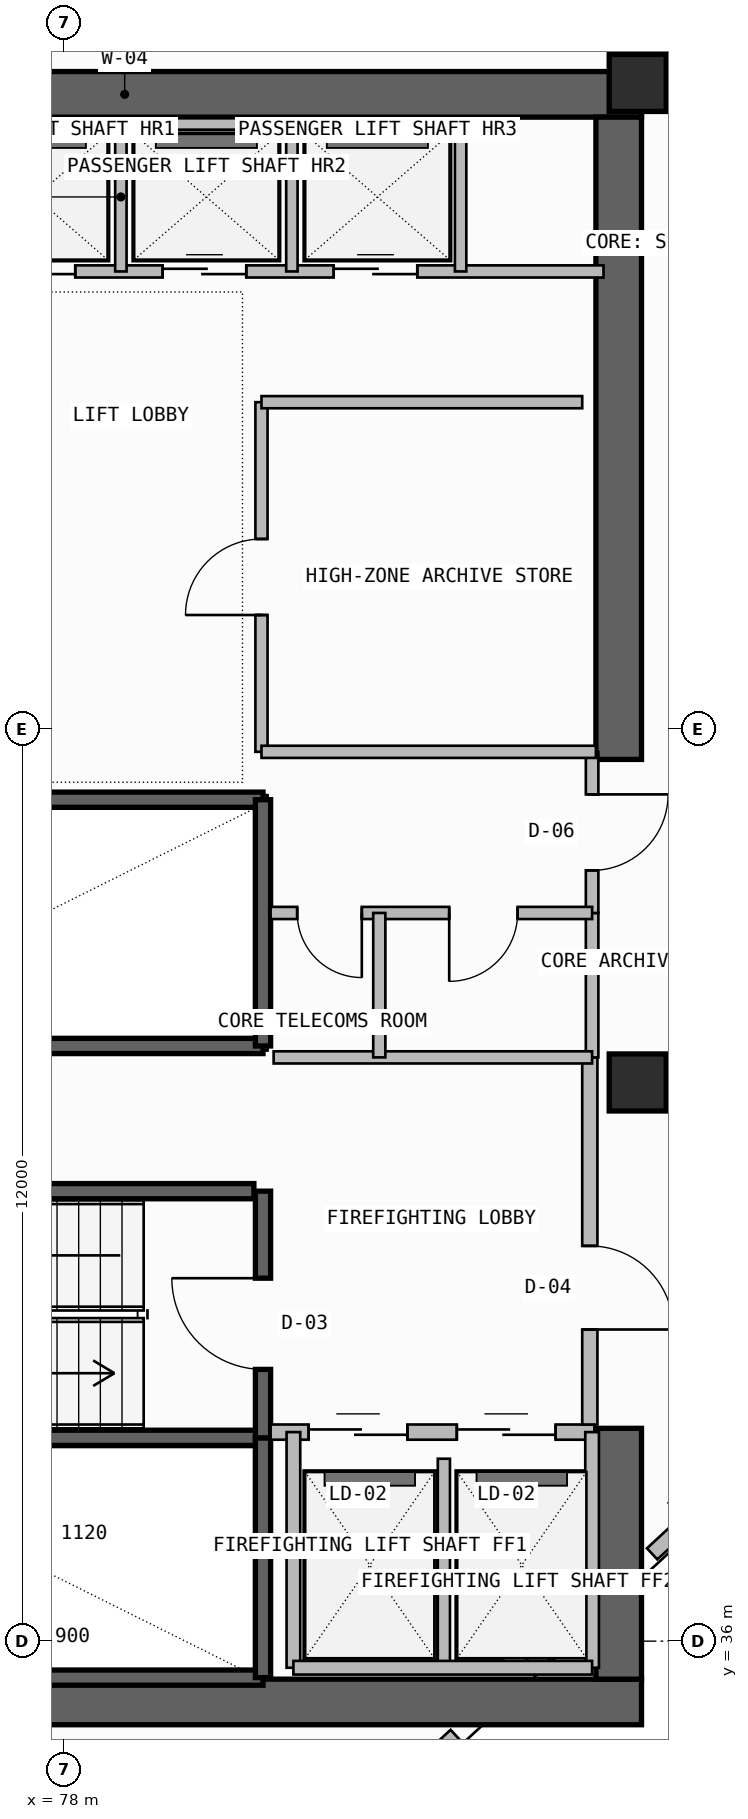
"""IFC4 building model, lengths in metres.
Left out: names, types, materials, properties, quantities, classifications, styles, units other than length and angle.
Written with IfcOpenShell. Run it as: python <this file> out.ifc"""

import sys

from ifc_helpers import new_model, si_unit, direction, frame, frame_2d, origin, origin_2d, place, context, subcontext, project, spatial, rectangle, extrude, element, fill, save


model = new_model("IFC4")
c1 = context("Model", 3, precision=1e-05, world=origin(), true_north=direction((0.0, 1.0)))
c2 = subcontext(c1, "Body", "Model", "MODEL_VIEW")
j1 = project(units=[si_unit("LENGTHUNIT", "METRE"), si_unit("PLANEANGLEUNIT", "RADIAN")], contexts=[c1])
p1 = place(None, origin())
s1 = spatial("IfcSite", under=j1, at=p1, CompositionType="ELEMENT")
p2 = place(p1, origin())
s2 = spatial("IfcBuilding", under=s1, at=p2, CompositionType="ELEMENT")
p3 = place(p2, frame((0.0, 0.0, 267.78)))
s3 = spatial("IfcBuildingStorey", under=s2, at=p3, CompositionType="ELEMENT", Elevation=267.78)
p4 = place(p3, frame((72.3, 35.2, -0.26), z_axis=(0.0, 0.0, 1.0), x_axis=(1.0, 0.0, 0.0)))
e1 = element("IfcWall", 1, at=p4, inside=s3, PredefinedType="SHEAR", context=c2, shape_type="SweptSolid", body=[
    extrude(rectangle(XDim=13.3, YDim=0.6, at=frame_2d((6.65, 0.0))), origin(), (0.0, 0.0, 1.0), 3.52),
])
p5 = place(p3, frame((85.3, 35.5, -0.26), z_axis=(0.0, 0.0, 1.0), x_axis=(0.0, 1.0, 0.0)))
e2 = element("IfcWall", 2, at=p5, inside=s3, PredefinedType="SHEAR", context=c2, shape_type="SweptSolid", body=[
    extrude(rectangle(XDim=3.3, YDim=0.6, at=frame_2d((1.65, 0.0))), origin(), (0.0, 0.0, 1.0), 3.52),
])
p6 = place(p3, frame((72.0, 56.35, -0.26), z_axis=(0.0, 0.0, 1.0), x_axis=(1.0, 0.0, 0.0)))
e3 = element("IfcWall", 3, at=p6, inside=s3, PredefinedType="SHEAR", context=c2, shape_type="SweptSolid", body=[
    extrude(rectangle(XDim=13.6, YDim=0.6, at=frame_2d((6.8, 0.0))), origin(), (0.0, 0.0, 1.0), 3.52),
])
p7 = place(p3, frame((85.3, 47.6, -0.26), z_axis=(0.0, 0.0, 1.0), x_axis=(0.0, 1.0, 0.0)))
e4 = element("IfcWall", 4, at=p7, inside=s3, PredefinedType="SHEAR", context=c2, shape_type="SweptSolid", body=[
    extrude(rectangle(XDim=8.45, YDim=0.6, at=frame_2d((4.225, 0.0))), origin(), (0.0, 0.0, 1.0), 3.52),
])
for number, where, z_axis, x_axis in (
    (5, (85.55, 43.35, 0.0), (0.0, 0.0, 1.0), (1.0, 0.0, 0.0)),
    (6, (85.55, 56.5, 0.0), (0.0, 0.0, 1.0), (1.0, 0.0, 0.0)),
):
    element("IfcColumn", number, at=place(p3, frame(where, z_axis=z_axis, x_axis=x_axis)), inside=s3, PredefinedType="COLUMN", context=c2, shape_type="SweptSolid", body=[
        extrude(rectangle(XDim=0.75, YDim=0.75, at=origin_2d()), origin(), (0.0, 0.0, 1.0), 3.52),
    ])
p8 = place(p3, frame((86.192, 37.566, 0.0), z_axis=(0.0, 0.0, 1.0), x_axis=(-0.734346728958, -0.678774544064, 0.0)))
e7 = element("IfcWall", 7, at=p8, inside=s3, PredefinedType="PARAPET", context=c2, shape_type="SweptSolid", body=[
    extrude(rectangle(XDim=0.615, YDim=0.2, at=frame_2d((0.308, 0.0))), origin(), (0.0, 0.0, 1.0), 1.15),
])
p9 = place(p3, frame((84.86, 36.335, 0.0), z_axis=(0.0, 0.0, 1.0), x_axis=(-0.734337093013, -0.678784968768, 0.0)))
e8 = element("IfcWall", 8, at=p9, inside=s3, PredefinedType="PARAPET", context=c2, shape_type="SweptSolid", body=[
    extrude(rectangle(XDim=1.024, YDim=0.2, at=frame_2d((0.512, 0.0))), origin(), (0.0, 0.0, 1.0), 1.15),
])
p10 = place(p3, frame((83.156, 34.76, 0.0), z_axis=(0.0, 0.0, 1.0), x_axis=(-0.734364355784, -0.678755473609, 0.0)))
e9 = element("IfcWall", 9, at=p10, inside=s3, PredefinedType="PARAPET", context=c2, shape_type="SweptSolid", body=[
    extrude(rectangle(XDim=1.045, YDim=0.2, at=frame_2d((0.522, 0.0))), origin(), (0.0, 0.0, 1.0), 1.15),
])
for number, where, z_axis, x_axis in (
    (10, (72.92, 35.52, -0.26), (0.0, 0.0, 1.0), (1.0, 0.0, 0.0)),
    (11, (72.92, 38.675, -0.26), (0.0, 0.0, 1.0), (1.0, 0.0, 0.0)),
):
    element("IfcWall", number, at=place(p3, frame(where, z_axis=z_axis, x_axis=x_axis)), inside=s3, PredefinedType="SOLIDWALL", context=c2, shape_type="SweptSolid", body=[
        extrude(rectangle(XDim=7.7, YDim=0.2, at=frame_2d((3.85, 0.0))), origin(), (0.0, 0.0, 1.0), 3.52),
    ])
p11 = place(p3, frame((80.62, 35.52, -0.26), z_axis=(0.0, 0.0, 1.0), x_axis=(0.0, 1.0, 0.0)))
e12 = element("IfcWall", 12, at=p11, inside=s3, PredefinedType="SOLIDWALL", context=c2, shape_type="SweptSolid", body=[
    extrude(rectangle(XDim=3.155, YDim=0.2, at=frame_2d((1.578, 0.0))), origin(), (0.0, 0.0, 1.0), 3.52),
])
p12 = place(p3, frame((80.62, 38.675, -0.26), z_axis=(0.0, 0.0, 1.0), x_axis=(0.0, 1.0, 0.0)))
e13 = element("IfcWall", 13, at=p12, inside=s3, PredefinedType="SOLIDWALL", context=c2, shape_type="SweptSolid", body=[
    extrude(rectangle(XDim=3.245, YDim=0.2, at=frame_2d((1.623, 0.0))), origin(), (0.0, 0.0, 1.0), 3.52),
])
p13 = place(p12, frame((0.9, 0.0, 0.26)))
e14 = element("IfcOpeningElement", 14, at=p13, cuts=e13, PredefinedType="OPENING", context=c2, shape_type="SweptSolid", body=[
    extrude(rectangle(XDim=1.2, YDim=2.2, at=frame_2d((0.6, 1.1))), frame((0.0, 0.11, 0.0), z_axis=(0.0, -1.0, 0.0), x_axis=(1.0, 0.0, 0.0)), (0.0, 0.0, 1.0), 0.22),
])
p14 = place(p3, frame((80.72, 38.75, 0.0), z_axis=(0.0, 0.0, 1.0), x_axis=(1.0, 0.0, 0.0)))
e15 = element("IfcWall", 15, at=p14, inside=s3, PredefinedType="SOLIDWALL", context=c2, shape_type="SweptSolid", body=[
    extrude(rectangle(XDim=4.26, YDim=0.2, at=frame_2d((2.13, 0.0))), origin(), (0.0, 0.0, 1.0), 3.26),
])
p15 = place(p14, frame((0.5, 0.0, 0.0)))
e16 = element("IfcOpeningElement", 16, at=p15, cuts=e15, PredefinedType="OPENING", context=c2, shape_type="SweptSolid", body=[
    extrude(rectangle(XDim=1.3, YDim=2.3, at=frame_2d((0.65, 1.15))), frame((0.0, 0.11, 0.0), z_axis=(0.0, -1.0, 0.0), x_axis=(1.0, 0.0, 0.0)), (0.0, 0.0, 1.0), 0.22),
])
p16 = place(p14, frame((2.45, 0.0, 0.0)))
e17 = element("IfcOpeningElement", 17, at=p16, cuts=e15, PredefinedType="OPENING", context=c2, shape_type="SweptSolid", body=[
    extrude(rectangle(XDim=1.3, YDim=2.3, at=frame_2d((0.65, 1.15))), frame((0.0, 0.11, 0.0), z_axis=(0.0, -1.0, 0.0), x_axis=(1.0, 0.0, 0.0)), (0.0, 0.0, 1.0), 0.22),
])
p17 = place(p3, frame((83.0, 35.65, 0.0), z_axis=(0.0, 0.0, 1.0), x_axis=(0.0, 1.0, 0.0)))
e18 = element("IfcWall", 18, at=p17, inside=s3, PredefinedType="PLUMBINGWALL", context=c2, shape_type="SweptSolid", body=[
    extrude(rectangle(XDim=2.75, YDim=0.16, at=frame_2d((1.375, 0.0))), origin(), (0.0, 0.0, 1.0), 3.26),
])
for number, where, z_axis, x_axis in (
    (19, (84.95, 35.65, 0.0), (0.0, 0.0, 1.0), (0.0, 1.0, 0.0)),
    (20, (81.02, 35.65, 0.0), (0.0, 0.0, 1.0), (0.0, 1.0, 0.0)),
):
    element("IfcWall", number, at=place(p3, frame(where, z_axis=z_axis, x_axis=x_axis)), inside=s3, PredefinedType="SOLIDWALL", context=c2, shape_type="SweptSolid", body=[
        extrude(rectangle(XDim=3.1, YDim=0.18, at=frame_2d((1.55, 0.0))), origin(), (0.0, 0.0, 1.0), 3.26),
    ])
p18 = place(p3, frame((81.02, 35.65, 0.0), z_axis=(0.0, 0.0, 1.0), x_axis=(1.0, 0.0, 0.0)))
e21 = element("IfcWall", 21, at=p18, inside=s3, PredefinedType="SOLIDWALL", context=c2, shape_type="SweptSolid", body=[
    extrude(rectangle(XDim=3.93, YDim=0.18, at=frame_2d((1.965, 0.0))), origin(), (0.0, 0.0, 1.0), 3.26),
])
p19 = place(p3, frame((84.92, 38.85, 0.0), z_axis=(0.0, 0.0, 1.0), x_axis=(0.0, 1.0, 0.0)))
e22 = element("IfcWall", 22, at=p19, inside=s3, PredefinedType="SOLIDWALL", context=c2, shape_type="SweptSolid", body=[
    extrude(rectangle(XDim=4.83, YDim=0.2, at=frame_2d((2.415, 0.0))), origin(), (0.0, 0.0, 1.0), 3.26),
])
p20 = place(p19, frame((1.25, 0.0, 0.0)))
e23 = element("IfcOpeningElement", 23, at=p20, cuts=e22, PredefinedType="OPENING", context=c2, shape_type="SweptSolid", body=[
    extrude(rectangle(XDim=1.1, YDim=2.2, at=frame_2d((0.55, 1.1))), frame((0.0, 0.11, 0.0), z_axis=(0.0, -1.0, 0.0), x_axis=(1.0, 0.0, 0.0)), (0.0, 0.0, 1.0), 0.22),
])
p21 = place(p3, frame((72.92, 41.92, -0.26), z_axis=(0.0, 0.0, 1.0), x_axis=(1.0, 0.0, 0.0)))
e24 = element("IfcWall", 24, at=p21, inside=s3, PredefinedType="SOLIDWALL", context=c2, shape_type="SweptSolid", body=[
    extrude(rectangle(XDim=7.58, YDim=0.2, at=frame_2d((3.79, 0.0))), origin(), (0.0, 0.0, 1.0), 3.52),
])
for number, where, z_axis, x_axis in (
    (25, (72.92, 43.83, -0.26), (0.0, 0.0, 1.0), (1.0, 0.0, 0.0)),
    (26, (72.92, 47.07, -0.26), (0.0, 0.0, 1.0), (1.0, 0.0, 0.0)),
):
    element("IfcWall", number, at=place(p3, frame(where, z_axis=z_axis, x_axis=x_axis)), inside=s3, PredefinedType="SOLIDWALL", context=c2, shape_type="SweptSolid", body=[
        extrude(rectangle(XDim=7.7, YDim=0.2, at=frame_2d((3.85, 0.0))), origin(), (0.0, 0.0, 1.0), 3.52),
    ])
p22 = place(p3, frame((80.62, 43.83, -0.26), z_axis=(0.0, 0.0, 1.0), x_axis=(0.0, 1.0, 0.0)))
e27 = element("IfcWall", 27, at=p22, inside=s3, PredefinedType="SOLIDWALL", context=c2, shape_type="SweptSolid", body=[
    extrude(rectangle(XDim=3.24, YDim=0.2, at=frame_2d((1.62, 0.0))), origin(), (0.0, 0.0, 1.0), 3.52),
])
p23 = place(p3, frame((84.95, 43.68, 0.0), z_axis=(0.0, 0.0, 1.0), x_axis=(0.0, 1.0, 0.0)))
e28 = element("IfcWall", 28, at=p23, inside=s3, PredefinedType="PLUMBINGWALL", context=c2, shape_type="SweptSolid", body=[
    extrude(rectangle(XDim=1.9, YDim=0.165, at=frame_2d((0.95, 0.0))), origin(), (0.0, 0.0, 1.0), 3.26),
])
p24 = place(p3, frame((84.95, 45.58, 0.0), z_axis=(0.0, 0.0, 1.0), x_axis=(0.0, 1.0, 0.0)))
e29 = element("IfcWall", 29, at=p24, inside=s3, PredefinedType="PARTITIONING", context=c2, shape_type="SweptSolid", body=[
    extrude(rectangle(XDim=2.12, YDim=0.165, at=frame_2d((1.06, 0.0))), origin(), (0.0, 0.0, 1.0), 3.26),
])
p25 = place(p24, frame((0.56, 0.0, 0.0)))
e30 = element("IfcOpeningElement", 30, at=p25, cuts=e29, PredefinedType="OPENING", context=c2, shape_type="SweptSolid", body=[
    extrude(rectangle(XDim=1.0, YDim=2.2, at=frame_2d((0.5, 1.1))), frame((0.0, 0.093, 0.0), z_axis=(0.0, -1.0, 0.0), x_axis=(1.0, 0.0, 0.0)), (0.0, 0.0, 1.0), 0.185),
])
p26 = place(p3, frame((80.72, 45.58, 0.0), z_axis=(0.0, 0.0, 1.0), x_axis=(1.0, 0.0, 0.0)))
e31 = element("IfcWall", 31, at=p26, inside=s3, PredefinedType="PLUMBINGWALL", context=c2, shape_type="SweptSolid", body=[
    extrude(rectangle(XDim=4.23, YDim=0.16, at=frame_2d((2.115, 0.0))), origin(), (0.0, 0.0, 1.0), 3.26),
])
p27 = place(p26, frame((0.35, 0.0, 0.0)))
e32 = element("IfcOpeningElement", 32, at=p27, cuts=e31, PredefinedType="OPENING", context=c2, shape_type="SweptSolid", body=[
    extrude(rectangle(XDim=0.85, YDim=2.05, at=frame_2d((0.425, 1.025))), frame((0.0, 0.09, 0.0), z_axis=(0.0, -1.0, 0.0), x_axis=(1.0, 0.0, 0.0)), (0.0, 0.0, 1.0), 0.18),
])
p28 = place(p26, frame((2.35, 0.0, 0.0)))
e33 = element("IfcOpeningElement", 33, at=p28, cuts=e31, PredefinedType="OPENING", context=c2, shape_type="SweptSolid", body=[
    extrude(rectangle(XDim=0.9, YDim=2.1, at=frame_2d((0.45, 1.05))), frame((0.0, 0.09, 0.0), z_axis=(0.0, -1.0, 0.0), x_axis=(1.0, 0.0, 0.0)), (0.0, 0.0, 1.0), 0.18),
])
p29 = place(p3, frame((80.76, 43.68, 0.0), z_axis=(0.0, 0.0, 1.0), x_axis=(1.0, 0.0, 0.0)))
e34 = element("IfcWall", 34, at=p29, inside=s3, PredefinedType="PLUMBINGWALL", context=c2, shape_type="SweptSolid", body=[
    extrude(rectangle(XDim=4.19, YDim=0.16, at=frame_2d((2.095, 0.0))), origin(), (0.0, 0.0, 1.0), 3.26),
])
p30 = place(p3, frame((82.15, 43.68, 0.0), z_axis=(0.0, 0.0, 1.0), x_axis=(0.0, 1.0, 0.0)))
e35 = element("IfcWall", 35, at=p30, inside=s3, PredefinedType="PLUMBINGWALL", context=c2, shape_type="SweptSolid", body=[
    extrude(rectangle(XDim=1.9, YDim=0.16, at=frame_2d((0.95, 0.0))), origin(), (0.0, 0.0, 1.0), 3.26),
])
p31 = place(p3, frame((80.6, 47.7, 0.0), z_axis=(0.0, 0.0, 1.0), x_axis=(0.0, 1.0, 0.0)))
e36 = element("IfcWall", 36, at=p31, inside=s3, PredefinedType="SOLIDWALL", context=c2, shape_type="SweptSolid", body=[
    extrude(rectangle(XDim=4.6, YDim=0.16, at=frame_2d((2.3, 0.0))), origin(), (0.0, 0.0, 1.0), 3.26),
])
p32 = place(p31, frame((1.8, 0.0, 0.0)))
e37 = element("IfcOpeningElement", 37, at=p32, cuts=e36, PredefinedType="OPENING", context=c2, shape_type="SweptSolid", body=[
    extrude(rectangle(XDim=1.0, YDim=2.2, at=frame_2d((0.5, 1.1))), frame((0.0, 0.09, 0.0), z_axis=(0.0, -1.0, 0.0), x_axis=(1.0, 0.0, 0.0)), (0.0, 0.0, 1.0), 0.18),
])
p33 = place(p3, frame((80.6, 47.7, 0.0), z_axis=(0.0, 0.0, 1.0), x_axis=(1.0, 0.0, 0.0)))
e38 = element("IfcWall", 38, at=p33, inside=s3, PredefinedType="SOLIDWALL", context=c2, shape_type="SweptSolid", body=[
    extrude(rectangle(XDim=4.4, YDim=0.16, at=frame_2d((2.2, 0.0))), origin(), (0.0, 0.0, 1.0), 3.26),
])
p34 = place(p3, frame((80.6, 52.3, 0.0), z_axis=(0.0, 0.0, 1.0), x_axis=(1.0, 0.0, 0.0)))
e39 = element("IfcWall", 39, at=p34, inside=s3, PredefinedType="SOLIDWALL", context=c2, shape_type="SweptSolid", body=[
    extrude(rectangle(XDim=4.22, YDim=0.16, at=frame_2d((2.11, 0.0))), origin(), (0.0, 0.0, 1.0), 3.26),
])
p35 = place(p3, frame((73.02, 54.02, 0.0), z_axis=(0.0, 0.0, 1.0), x_axis=(1.0, 0.0, 0.0)))
e40 = element("IfcWall", 40, at=p35, inside=s3, PredefinedType="SOLIDWALL", context=c2, shape_type="SweptSolid", body=[
    extrude(rectangle(XDim=12.08, YDim=0.16, at=frame_2d((6.04, 0.0))), origin(), (0.0, 0.0, 1.0), 3.26),
])
p36 = place(p35, frame((4.03, 0.0, 0.0)))
e41 = element("IfcOpeningElement", 41, at=p36, cuts=e40, PredefinedType="OPENING", context=c2, shape_type="SweptSolid", body=[
    extrude(rectangle(XDim=1.1, YDim=2.25, at=frame_2d((0.55, 1.125))), frame((0.0, 0.09, 0.0), z_axis=(0.0, -1.0, 0.0), x_axis=(1.0, 0.0, 0.0)), (0.0, 0.0, 1.0), 0.18),
])
p37 = place(p35, frame((6.28, 0.0, 0.0)))
e42 = element("IfcOpeningElement", 42, at=p37, cuts=e40, PredefinedType="OPENING", context=c2, shape_type="SweptSolid", body=[
    extrude(rectangle(XDim=1.1, YDim=2.25, at=frame_2d((0.55, 1.125))), frame((0.0, 0.09, 0.0), z_axis=(0.0, -1.0, 0.0), x_axis=(1.0, 0.0, 0.0)), (0.0, 0.0, 1.0), 0.18),
])
p38 = place(p35, frame((8.53, 0.0, 0.0)))
e43 = element("IfcOpeningElement", 43, at=p38, cuts=e40, PredefinedType="OPENING", context=c2, shape_type="SweptSolid", body=[
    extrude(rectangle(XDim=1.1, YDim=2.25, at=frame_2d((0.55, 1.125))), frame((0.0, 0.09, 0.0), z_axis=(0.0, -1.0, 0.0), x_axis=(1.0, 0.0, 0.0)), (0.0, 0.0, 1.0), 0.18),
])
for number, where, z_axis, x_axis in (
    (44, (78.75, 54.02, 0.0), (0.0, 0.0, 1.0), (0.0, 1.0, 0.0)),
    (45, (81.0, 54.02, 0.0), (0.0, 0.0, 1.0), (0.0, 1.0, 0.0)),
):
    element("IfcWall", number, at=place(p3, frame(where, z_axis=z_axis, x_axis=x_axis)), inside=s3, PredefinedType="PLUMBINGWALL", context=c2, shape_type="SweptSolid", body=[
        extrude(rectangle(XDim=1.96, YDim=0.15, at=frame_2d((0.98, 0.0))), origin(), (0.0, 0.0, 1.0), 3.26),
    ])
p39 = place(p3, frame((83.22, 54.02, 0.0), z_axis=(0.0, 0.0, 1.0), x_axis=(0.0, 1.0, 0.0)))
e46 = element("IfcWall", 46, at=p39, inside=s3, PredefinedType="SOLIDWALL", context=c2, shape_type="SweptSolid", body=[
    extrude(rectangle(XDim=1.96, YDim=0.15, at=frame_2d((0.98, 0.0))), origin(), (0.0, 0.0, 1.0), 3.26),
])
p40 = place(p3, frame((76.52, 55.96, 0.0), z_axis=(0.0, 0.0, 1.0), x_axis=(1.0, 0.0, 0.0)))
e47 = element("IfcWall", 47, at=p40, inside=s3, PredefinedType="SOLIDWALL", context=c2, shape_type="SweptSolid", body=[
    extrude(rectangle(XDim=6.7, YDim=0.15, at=frame_2d((3.35, 0.0))), origin(), (0.0, 0.0, 1.0), 3.26),
])
p41 = place(p13, origin())
e48 = element("IfcDoor", 48, at=p41, inside=s3, OperationType="SINGLE_SWING_RIGHT", PredefinedType="USERDEFINED", context=c2, shape_type="SweptSolid", body=[
    extrude(rectangle(XDim=1.2, YDim=2.2, at=frame_2d((0.6, 1.1))), frame((0.0, 0.025, 0.0), z_axis=(0.0, -1.0, 0.0), x_axis=(1.0, 0.0, 0.0)), (0.0, 0.0, 1.0), 0.05),
])
fill(e14, e48)
p42 = place(p15, origin())
e49 = element("IfcDoor", 49, at=p42, inside=s3, OperationType="DOUBLE_DOOR_SLIDING", PredefinedType="DOOR", context=c2, shape_type="SweptSolid", body=[
    extrude(rectangle(XDim=1.3, YDim=2.3, at=frame_2d((0.65, 1.15))), frame((0.0, 0.025, 0.0), z_axis=(0.0, -1.0, 0.0), x_axis=(1.0, 0.0, 0.0)), (0.0, 0.0, 1.0), 0.05),
])
fill(e16, e49)
p43 = place(p16, origin())
e50 = element("IfcDoor", 50, at=p43, inside=s3, OperationType="DOUBLE_DOOR_SLIDING", PredefinedType="DOOR", context=c2, shape_type="SweptSolid", body=[
    extrude(rectangle(XDim=1.3, YDim=2.3, at=frame_2d((0.65, 1.15))), frame((0.0, 0.025, 0.0), z_axis=(0.0, -1.0, 0.0), x_axis=(1.0, 0.0, 0.0)), (0.0, 0.0, 1.0), 0.05),
])
fill(e17, e50)
p44 = place(p20, frame((1.1, 0.0, 0.0), z_axis=(0.0, 0.0, 1.0), x_axis=(-1.0, 0.0, 0.0)))
e51 = element("IfcDoor", 51, at=p44, inside=s3, OperationType="SINGLE_SWING_RIGHT", PredefinedType="DOOR", context=c2, shape_type="SweptSolid", body=[
    extrude(rectangle(XDim=1.1, YDim=2.2, at=frame_2d((0.55, 1.1))), frame((0.0, 0.025, 0.0), z_axis=(0.0, -1.0, 0.0), x_axis=(1.0, 0.0, 0.0)), (0.0, 0.0, 1.0), 0.05),
])
fill(e23, e51)
p45 = place(p25, frame((1.0, 0.0, 0.0), z_axis=(0.0, 0.0, 1.0), x_axis=(-1.0, 0.0, 0.0)))
e52 = element("IfcDoor", 52, at=p45, inside=s3, OperationType="SINGLE_SWING_LEFT", PredefinedType="DOOR", context=c2, shape_type="SweptSolid", body=[
    extrude(rectangle(XDim=1.0, YDim=2.2, at=frame_2d((0.5, 1.1))), frame((0.0, 0.025, 0.0), z_axis=(0.0, -1.0, 0.0), x_axis=(1.0, 0.0, 0.0)), (0.0, 0.0, 1.0), 0.05),
])
fill(e30, e52)
p46 = place(p27, frame((0.85, 0.0, 0.0), z_axis=(0.0, 0.0, 1.0), x_axis=(-1.0, 0.0, 0.0)))
e53 = element("IfcDoor", 53, at=p46, inside=s3, OperationType="SINGLE_SWING_LEFT", PredefinedType="DOOR", context=c2, shape_type="SweptSolid", body=[
    extrude(rectangle(XDim=0.85, YDim=2.05, at=frame_2d((0.425, 1.025))), frame((0.0, 0.025, 0.0), z_axis=(0.0, -1.0, 0.0), x_axis=(1.0, 0.0, 0.0)), (0.0, 0.0, 1.0), 0.05),
])
fill(e32, e53)
p47 = place(p28, frame((0.9, 0.0, 0.0), z_axis=(0.0, 0.0, 1.0), x_axis=(-1.0, 0.0, 0.0)))
e54 = element("IfcDoor", 54, at=p47, inside=s3, OperationType="SINGLE_SWING_RIGHT", PredefinedType="DOOR", context=c2, shape_type="SweptSolid", body=[
    extrude(rectangle(XDim=0.9, YDim=2.1, at=frame_2d((0.45, 1.05))), frame((0.0, 0.025, 0.0), z_axis=(0.0, -1.0, 0.0), x_axis=(1.0, 0.0, 0.0)), (0.0, 0.0, 1.0), 0.05),
])
fill(e33, e54)
p48 = place(p32, origin())
e55 = element("IfcDoor", 55, at=p48, inside=s3, OperationType="SINGLE_SWING_LEFT", PredefinedType="DOOR", context=c2, shape_type="SweptSolid", body=[
    extrude(rectangle(XDim=1.0, YDim=2.2, at=frame_2d((0.5, 1.1))), frame((0.0, 0.025, 0.0), z_axis=(0.0, -1.0, 0.0), x_axis=(1.0, 0.0, 0.0)), (0.0, 0.0, 1.0), 0.05),
])
fill(e37, e55)
p49 = place(p36, origin())
e56 = element("IfcDoor", 56, at=p49, inside=s3, OperationType="DOUBLE_DOOR_SLIDING", PredefinedType="DOOR", context=c2, shape_type="SweptSolid", body=[
    extrude(rectangle(XDim=1.1, YDim=2.25, at=frame_2d((0.55, 1.125))), frame((0.0, 0.025, 0.0), z_axis=(0.0, -1.0, 0.0), x_axis=(1.0, 0.0, 0.0)), (0.0, 0.0, 1.0), 0.05),
])
fill(e41, e56)
p50 = place(p37, origin())
e57 = element("IfcDoor", 57, at=p50, inside=s3, OperationType="DOUBLE_DOOR_SLIDING", PredefinedType="DOOR", context=c2, shape_type="SweptSolid", body=[
    extrude(rectangle(XDim=1.1, YDim=2.25, at=frame_2d((0.55, 1.125))), frame((0.0, 0.025, 0.0), z_axis=(0.0, -1.0, 0.0), x_axis=(1.0, 0.0, 0.0)), (0.0, 0.0, 1.0), 0.05),
])
fill(e42, e57)
p51 = place(p38, origin())
e58 = element("IfcDoor", 58, at=p51, inside=s3, OperationType="DOUBLE_DOOR_SLIDING", PredefinedType="DOOR", context=c2, shape_type="SweptSolid", body=[
    extrude(rectangle(XDim=1.1, YDim=2.25, at=frame_2d((0.55, 1.125))), frame((0.0, 0.025, 0.0), z_axis=(0.0, -1.0, 0.0), x_axis=(1.0, 0.0, 0.0)), (0.0, 0.0, 1.0), 0.05),
])
fill(e43, e58)
save(model, sys.argv[1])
